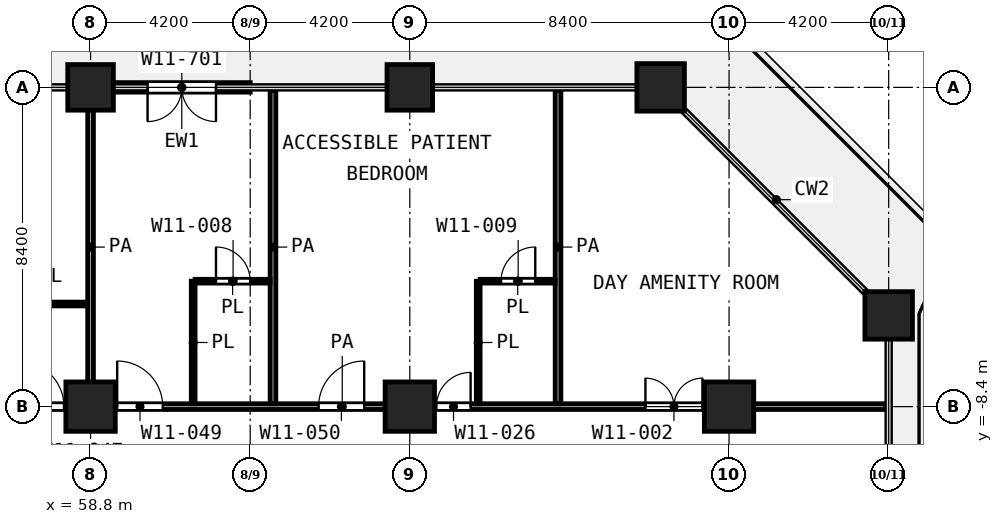
"""IFC4 building model, lengths in metres.
Left out: names, types, materials, properties, quantities, classifications, styles, units other than length and angle.
Written with IfcOpenShell. Run it as: python <this file> out.ifc"""

import sys

from ifc_helpers import new_model, si_unit, direction, frame, frame_2d, origin, origin_2d, place, context, subcontext, project, spatial, rectangle, extrude, element, fill, save


model = new_model("IFC4")
c1 = context("Model", 3, precision=1e-05, world=origin(), true_north=direction((0.0, 1.0)))
c2 = subcontext(c1, "Body", "Model", "MODEL_VIEW")
j1 = project(units=[si_unit("LENGTHUNIT", "METRE"), si_unit("PLANEANGLEUNIT", "RADIAN")], contexts=[c1])
p1 = place(None, origin())
s1 = spatial("IfcSite", under=j1, at=p1, CompositionType="ELEMENT")
p2 = place(p1, origin())
s2 = spatial("IfcBuilding", under=s1, at=p2, CompositionType="ELEMENT")
p3 = place(p2, frame((0.0, 0.0, 51.8)))
s3 = spatial("IfcBuildingStorey", under=s2, at=p3, CompositionType="ELEMENT", Elevation=51.8)
for number, where, z_axis, x_axis in (
    (1, (58.8, 0.0, 0.0), (0.0, 0.0, 1.0), (1.0, 0.0, 0.0)),
    (2, (67.2, 0.0, 0.0), (0.0, 0.0, 1.0), (1.0, 0.0, 0.0)),
):
    element("IfcColumn", number, at=place(p3, frame(where, z_axis=z_axis, x_axis=x_axis)), inside=s3, PredefinedType="COLUMN", context=c2, shape_type="SweptSolid", body=[
        extrude(rectangle(XDim=1.2, YDim=1.2, at=origin_2d()), origin(), (0.0, 0.0, 1.0), 4.2),
    ])
for number, where, z_axis, x_axis in (
    (3, (73.8, 0.0, 0.0), (0.0, 0.0, 1.0), (1.0, 0.0, 0.0)),
    (4, (79.8, -6.0, 0.0), (0.0, 0.0, 1.0), (1.0, 0.0, 0.0)),
):
    element("IfcColumn", number, at=place(p3, frame(where, z_axis=z_axis, x_axis=x_axis)), inside=s3, PredefinedType="COLUMN", context=c2, shape_type="SweptSolid", body=[
        extrude(rectangle(XDim=1.25, YDim=1.25, at=origin_2d()), origin(), (0.0, 0.0, 1.0), 4.2),
    ])
for number, where, z_axis, x_axis in (
    (5, (58.8, -8.4, 0.0), (0.0, 0.0, 1.0), (1.0, 0.0, 0.0)),
    (6, (67.2, -8.4, 0.0), (0.0, 0.0, 1.0), (1.0, 0.0, 0.0)),
    (7, (75.6, -8.4, 0.0), (0.0, 0.0, 1.0), (1.0, 0.0, 0.0)),
):
    element("IfcColumn", number, at=place(p3, frame(where, z_axis=z_axis, x_axis=x_axis)), inside=s3, PredefinedType="COLUMN", context=c2, shape_type="SweptSolid", body=[
        extrude(rectangle(XDim=1.3, YDim=1.3, at=origin_2d()), origin(), (0.0, 0.0, 1.0), 4.2),
    ])
p4 = place(p3, frame((63.0, 0.0, 0.0), z_axis=(0.0, 0.0, 1.0), x_axis=(-1.0, 0.0, 0.0)))
e8 = element("IfcWall", 8, at=p4, inside=s3, PredefinedType="SOLIDWALL", context=c2, shape_type="SweptSolid", body=[
    extrude(rectangle(XDim=3.6, YDim=0.25, at=frame_2d((1.8, 0.0))), origin(), (0.0, 0.0, 1.0), 3.78),
])
p5 = place(p4, frame((0.9, 0.0, 0.0)))
e9 = element("IfcOpeningElement", 9, at=p5, cuts=e8, PredefinedType="OPENING", context=c2, shape_type="SweptSolid", body=[
    extrude(rectangle(XDim=1.8, YDim=2.1, at=frame_2d((0.9, 1.05))), frame((0.0, 0.135, 0.0), z_axis=(0.0, -1.0, 0.0), x_axis=(1.0, 0.0, 0.0)), (0.0, 0.0, 1.0), 0.27),
])
p6 = place(p3, frame((56.75, -5.7, 0.0), z_axis=(0.0, 0.0, 1.0), x_axis=(1.0, 0.0, 0.0)))
e10 = element("IfcWall", 10, at=p6, inside=s3, PredefinedType="PARTITIONING", context=c2, shape_type="SweptSolid", body=[
    extrude(rectangle(XDim=1.975, YDim=0.1, at=frame_2d((0.988, 0.0))), origin(), (0.0, 0.0, 1.0), 3.9),
])
p7 = place(p3, frame((61.55, -5.1, 0.0), z_axis=(0.0, 0.0, 1.0), x_axis=(1.0, 0.0, 0.0)))
e11 = element("IfcWall", 11, at=p7, inside=s3, PredefinedType="PARTITIONING", context=c2, shape_type="SweptSolid", body=[
    extrude(rectangle(XDim=1.975, YDim=0.1, at=frame_2d((0.987, 0.0))), origin(), (0.0, 0.0, 1.0), 3.9),
])
p8 = place(p7, frame((0.55, 0.0, 0.0)))
e12 = element("IfcOpeningElement", 12, at=p8, cuts=e11, PredefinedType="OPENING", context=c2, shape_type="SweptSolid", body=[
    extrude(rectangle(XDim=0.9, YDim=2.1, at=frame_2d((0.45, 1.05))), frame((0.0, 0.06, 0.0), z_axis=(0.0, -1.0, 0.0), x_axis=(1.0, 0.0, 0.0)), (0.0, 0.0, 1.0), 0.12),
])
p9 = place(p3, frame((69.052, -5.1, 0.0), z_axis=(0.0, 0.0, 1.0), x_axis=(1.0, 0.0, 0.0)))
e13 = element("IfcWall", 13, at=p9, inside=s3, PredefinedType="PARTITIONING", context=c2, shape_type="SweptSolid", body=[
    extrude(rectangle(XDim=1.973, YDim=0.1, at=frame_2d((0.986, 0.0))), origin(), (0.0, 0.0, 1.0), 3.9),
])
p10 = place(p9, frame((0.549, 0.0, 0.0)))
e14 = element("IfcOpeningElement", 14, at=p10, cuts=e13, PredefinedType="OPENING", context=c2, shape_type="SweptSolid", body=[
    extrude(rectangle(XDim=0.9, YDim=2.1, at=frame_2d((0.45, 1.05))), frame((0.0, 0.06, 0.0), z_axis=(0.0, -1.0, 0.0), x_axis=(1.0, 0.0, 0.0)), (0.0, 0.0, 1.0), 0.12),
])
p11 = place(p3, frame((61.5, -8.325, 0.0), z_axis=(0.0, 0.0, 1.0), x_axis=(0.0, 1.0, 0.0)))
e15 = element("IfcWall", 15, at=p11, inside=s3, PredefinedType="PARTITIONING", context=c2, shape_type="SweptSolid", body=[
    extrude(rectangle(XDim=3.225, YDim=0.1, at=frame_2d((1.612, 0.0))), origin(), (0.0, 0.0, 1.0), 3.9),
])
p12 = place(p3, frame((69.0, -8.325, 0.0), z_axis=(0.0, 0.0, 1.0), x_axis=(0.0, 1.0, 0.0)))
e16 = element("IfcWall", 16, at=p12, inside=s3, PredefinedType="PARTITIONING", context=c2, shape_type="SweptSolid", body=[
    extrude(rectangle(XDim=3.224, YDim=0.1, at=frame_2d((1.612, 0.0))), origin(), (0.0, 0.0, 1.0), 3.9),
])
p13 = place(p3, frame((51.125, -8.4, 0.0), z_axis=(0.0, 0.0, 1.0), x_axis=(1.0, 0.0, 0.0)))
e17 = element("IfcWall", 17, at=p13, inside=s3, PredefinedType="PARTITIONING", context=c2, shape_type="SweptSolid", body=[
    extrude(rectangle(XDim=28.595, YDim=0.15, at=frame_2d((14.297, 0.0))), origin(), (0.0, 0.0, 1.0), 3.9),
])
p14 = place(p13, frame((1.825, 0.0, 0.0)))
e18 = element("IfcOpeningElement", 18, at=p14, cuts=e17, PredefinedType="OPENING", context=c2, shape_type="SweptSolid", body=[
    extrude(rectangle(XDim=1.2, YDim=2.1, at=frame_2d((0.6, 1.05))), frame((0.0, 0.085, 0.0), z_axis=(0.0, -1.0, 0.0), x_axis=(1.0, 0.0, 0.0)), (0.0, 0.0, 1.0), 0.17),
])
p15 = place(p13, frame((3.375, 0.0, 0.0)))
e19 = element("IfcOpeningElement", 19, at=p15, cuts=e17, PredefinedType="OPENING", context=c2, shape_type="SweptSolid", body=[
    extrude(rectangle(XDim=1.2, YDim=2.1, at=frame_2d((0.6, 1.05))), frame((0.0, 0.085, 0.0), z_axis=(0.0, -1.0, 0.0), x_axis=(1.0, 0.0, 0.0)), (0.0, 0.0, 1.0), 0.17),
])
p16 = place(p13, frame((5.775, 0.0, 0.0)))
e20 = element("IfcOpeningElement", 20, at=p16, cuts=e17, PredefinedType="OPENING", context=c2, shape_type="SweptSolid", body=[
    extrude(rectangle(XDim=1.2, YDim=2.1, at=frame_2d((0.6, 1.05))), frame((0.0, 0.085, 0.0), z_axis=(0.0, -1.0, 0.0), x_axis=(1.0, 0.0, 0.0)), (0.0, 0.0, 1.0), 0.17),
])
p17 = place(p13, frame((8.375, 0.0, 0.0)))
e21 = element("IfcOpeningElement", 21, at=p17, cuts=e17, PredefinedType="OPENING", context=c2, shape_type="SweptSolid", body=[
    extrude(rectangle(XDim=1.2, YDim=2.1, at=frame_2d((0.6, 1.05))), frame((0.0, 0.085, 0.0), z_axis=(0.0, -1.0, 0.0), x_axis=(1.0, 0.0, 0.0)), (0.0, 0.0, 1.0), 0.17),
])
p18 = place(p13, frame((13.675, 0.0, 0.0)))
e22 = element("IfcOpeningElement", 22, at=p18, cuts=e17, PredefinedType="OPENING", context=c2, shape_type="SweptSolid", body=[
    extrude(rectangle(XDim=1.2, YDim=2.1, at=frame_2d((0.6, 1.05))), frame((0.0, 0.085, 0.0), z_axis=(0.0, -1.0, 0.0), x_axis=(1.0, 0.0, 0.0)), (0.0, 0.0, 1.0), 0.17),
])
p19 = place(p13, frame((16.775, 0.0, 0.0)))
e23 = element("IfcOpeningElement", 23, at=p19, cuts=e17, PredefinedType="OPENING", context=c2, shape_type="SweptSolid", body=[
    extrude(rectangle(XDim=0.9, YDim=2.1, at=frame_2d((0.45, 1.05))), frame((0.0, 0.085, 0.0), z_axis=(0.0, -1.0, 0.0), x_axis=(1.0, 0.0, 0.0)), (0.0, 0.0, 1.0), 0.17),
])
p20 = place(p13, frame((22.275, 0.0, 0.0)))
e24 = element("IfcOpeningElement", 24, at=p20, cuts=e17, PredefinedType="OPENING", context=c2, shape_type="SweptSolid", body=[
    extrude(rectangle(XDim=1.5, YDim=2.1, at=frame_2d((0.75, 1.05))), frame((0.0, 0.085, 0.0), z_axis=(0.0, -1.0, 0.0), x_axis=(1.0, 0.0, 0.0)), (0.0, 0.0, 1.0), 0.17),
])
for number, where, z_axis, x_axis in (
    (25, (58.8, -8.325, 0.0), (0.0, 0.0, 1.0), (0.0, 1.0, 0.0)),
    (26, (63.6, -8.325, 0.0), (0.0, 0.0, 1.0), (0.0, 1.0, 0.0)),
    (27, (71.1, -8.325, 0.0), (0.0, 0.0, 1.0), (0.0, 1.0, 0.0)),
):
    element("IfcWall", number, at=place(p3, frame(where, z_axis=z_axis, x_axis=x_axis)), inside=s3, PredefinedType="PARTITIONING", context=c2, shape_type="SweptSolid", body=[
        extrude(rectangle(XDim=8.245, YDim=0.15, at=frame_2d((4.123, 0.0))), origin(), (0.0, 0.0, 1.0), 3.9),
    ])
p21 = place(p5, origin())
e28 = element("IfcDoor", 28, at=p21, inside=s3, OperationType="DOUBLE_DOOR_SINGLE_SWING", PredefinedType="DOOR", context=c2, shape_type="SweptSolid", body=[
    extrude(rectangle(XDim=1.8, YDim=2.1, at=frame_2d((0.9, 1.05))), frame((0.0, 0.025, 0.0), z_axis=(0.0, -1.0, 0.0), x_axis=(1.0, 0.0, 0.0)), (0.0, 0.0, 1.0), 0.05),
])
fill(e9, e28)
p22 = place(p16, origin())
e29 = element("IfcDoor", 29, at=p22, inside=s3, OperationType="SINGLE_SWING_LEFT", PredefinedType="DOOR", context=c2, shape_type="SweptSolid", body=[
    extrude(rectangle(XDim=1.2, YDim=2.1, at=frame_2d((0.6, 1.05))), frame((0.0, 0.025, 0.0), z_axis=(0.0, -1.0, 0.0), x_axis=(1.0, 0.0, 0.0)), (0.0, 0.0, 1.0), 0.05),
])
fill(e20, e29)
p23 = place(p17, origin())
e30 = element("IfcDoor", 30, at=p23, inside=s3, OperationType="SINGLE_SWING_LEFT", PredefinedType="DOOR", context=c2, shape_type="SweptSolid", body=[
    extrude(rectangle(XDim=1.2, YDim=2.1, at=frame_2d((0.6, 1.05))), frame((0.0, 0.025, 0.0), z_axis=(0.0, -1.0, 0.0), x_axis=(1.0, 0.0, 0.0)), (0.0, 0.0, 1.0), 0.05),
])
fill(e21, e30)
p24 = place(p8, origin())
e31 = element("IfcDoor", 31, at=p24, inside=s3, OperationType="SINGLE_SWING_LEFT", PredefinedType="DOOR", context=c2, shape_type="SweptSolid", body=[
    extrude(rectangle(XDim=0.9, YDim=2.1, at=frame_2d((0.45, 1.05))), frame((0.0, 0.025, 0.0), z_axis=(0.0, -1.0, 0.0), x_axis=(1.0, 0.0, 0.0)), (0.0, 0.0, 1.0), 0.05),
])
fill(e12, e31)
p25 = place(p18, origin())
e32 = element("IfcDoor", 32, at=p25, inside=s3, OperationType="SINGLE_SWING_RIGHT", PredefinedType="DOOR", context=c2, shape_type="SweptSolid", body=[
    extrude(rectangle(XDim=1.2, YDim=2.1, at=frame_2d((0.6, 1.05))), frame((0.0, 0.025, 0.0), z_axis=(0.0, -1.0, 0.0), x_axis=(1.0, 0.0, 0.0)), (0.0, 0.0, 1.0), 0.05),
])
fill(e22, e32)
p26 = place(p19, origin())
e33 = element("IfcDoor", 33, at=p26, inside=s3, OperationType="SINGLE_SWING_RIGHT", PredefinedType="DOOR", context=c2, shape_type="SweptSolid", body=[
    extrude(rectangle(XDim=0.9, YDim=2.1, at=frame_2d((0.45, 1.05))), frame((0.0, 0.025, 0.0), z_axis=(0.0, -1.0, 0.0), x_axis=(1.0, 0.0, 0.0)), (0.0, 0.0, 1.0), 0.05),
])
fill(e23, e33)
p27 = place(p10, origin())
e34 = element("IfcDoor", 34, at=p27, inside=s3, OperationType="SINGLE_SWING_RIGHT", PredefinedType="DOOR", context=c2, shape_type="SweptSolid", body=[
    extrude(rectangle(XDim=0.9, YDim=2.1, at=frame_2d((0.45, 1.05))), frame((0.0, 0.025, 0.0), z_axis=(0.0, -1.0, 0.0), x_axis=(1.0, 0.0, 0.0)), (0.0, 0.0, 1.0), 0.05),
])
fill(e14, e34)
p28 = place(p20, origin())
e35 = element("IfcDoor", 35, at=p28, inside=s3, OperationType="DOUBLE_DOOR_SINGLE_SWING", PredefinedType="DOOR", context=c2, shape_type="SweptSolid", body=[
    extrude(rectangle(XDim=1.5, YDim=2.1, at=frame_2d((0.75, 1.05))), frame((0.0, 0.025, 0.0), z_axis=(0.0, -1.0, 0.0), x_axis=(1.0, 0.0, 0.0)), (0.0, 0.0, 1.0), 0.05),
])
fill(e24, e35)
save(model, sys.argv[1])
